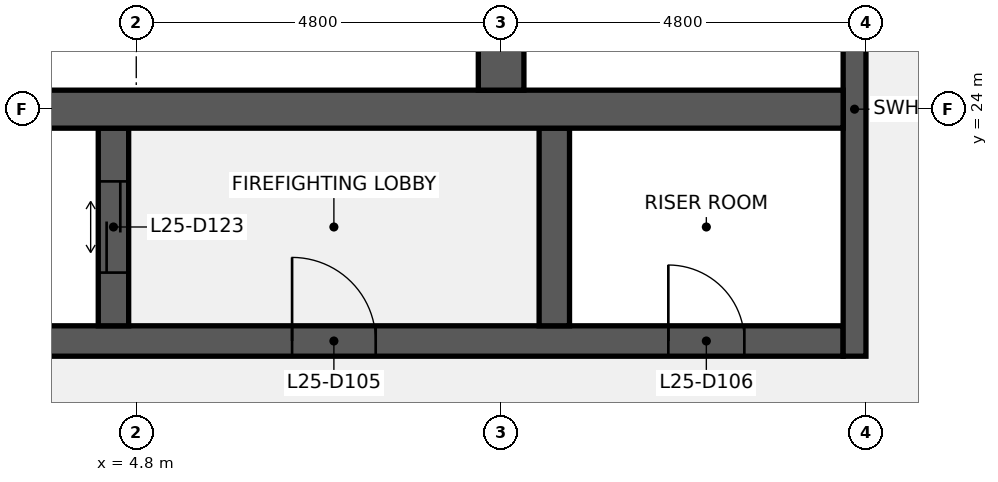
"""IFC4 building model, lengths in metres.
Left out: names, types, materials, properties, quantities, classifications, styles, units other than length and angle.
Written with IfcOpenShell. Run it as: python <this file> out.ifc"""

import sys

from ifc_helpers import new_model, si_unit, direction, frame, frame_2d, origin, place, context, subcontext, project, spatial, rectangle, extrude, element, fill, save


model = new_model("IFC4")
c1 = context("Model", 3, precision=1e-05, world=origin(), true_north=direction((0.0, 1.0)))
c2 = subcontext(c1, "Body", "Model", "MODEL_VIEW")
j1 = project(units=[si_unit("LENGTHUNIT", "METRE"), si_unit("PLANEANGLEUNIT", "RADIAN")], contexts=[c1])
p1 = place(None, origin())
s1 = spatial("IfcSite", under=j1, at=p1, CompositionType="ELEMENT")
p2 = place(p1, origin())
s2 = spatial("IfcBuilding", under=s1, at=p2, CompositionType="ELEMENT")
p3 = place(p2, frame((0.0, 0.0, 120.1)))
s3 = spatial("IfcBuildingStorey", under=s2, at=p3, CompositionType="ELEMENT", Elevation=120.1)
p4 = place(p3, frame((1.0, 20.95, 0.0), z_axis=(0.0, 0.0, 1.0), x_axis=(1.0, 0.0, 0.0)))
e1 = element("IfcWall", 1, at=p4, inside=s3, PredefinedType="SHEAR", context=c2, shape_type="SweptSolid", body=[
    extrude(rectangle(XDim=13.1, YDim=0.4, at=frame_2d((6.55, 0.0))), origin(), (0.0, 0.0, 1.0), 3.84),
])
p5 = place(p4, frame((5.85, 0.0, 0.0)))
e2 = element("IfcOpeningElement", 2, at=p5, cuts=e1, PredefinedType="OPENING", context=c2, shape_type="SweptSolid", body=[
    extrude(rectangle(XDim=1.1, YDim=2.1, at=frame_2d((0.55, 1.05))), frame((0.0, 0.21, 0.0), z_axis=(0.0, -1.0, 0.0), x_axis=(1.0, 0.0, 0.0)), (0.0, 0.0, 1.0), 0.42),
])
p6 = place(p4, frame((10.8, 0.0, 0.0)))
e3 = element("IfcOpeningElement", 3, at=p6, cuts=e1, PredefinedType="OPENING", context=c2, shape_type="SweptSolid", body=[
    extrude(rectangle(XDim=1.0, YDim=2.1, at=frame_2d((0.5, 1.05))), frame((0.0, 0.21, 0.0), z_axis=(0.0, -1.0, 0.0), x_axis=(1.0, 0.0, 0.0)), (0.0, 0.0, 1.0), 0.42),
])
p7 = place(p3, frame((14.25, 20.75, 0.0), z_axis=(0.0, 0.0, 1.0), x_axis=(0.0, 1.0, 0.0)))
e4 = element("IfcWall", 4, at=p7, inside=s3, PredefinedType="SHEAR", context=c2, shape_type="SweptSolid", body=[
    extrude(rectangle(XDim=6.5, YDim=0.3, at=frame_2d((3.25, 0.0))), origin(), (0.0, 0.0, 1.0), 3.84),
])
p8 = place(p3, frame((4.5, 21.15, 0.0), z_axis=(0.0, 0.0, 1.0), x_axis=(0.0, 1.0, 0.0)))
e5 = element("IfcWall", 5, at=p8, inside=s3, PredefinedType="SHEAR", context=c2, shape_type="SweptSolid", body=[
    extrude(rectangle(XDim=2.6, YDim=0.4, at=frame_2d((1.3, 0.0))), origin(), (0.0, 0.0, 1.0), 3.84),
])
p9 = place(p8, frame((0.7, 0.0, 0.0)))
e6 = element("IfcOpeningElement", 6, at=p9, cuts=e5, PredefinedType="OPENING", context=c2, shape_type="SweptSolid", body=[
    extrude(rectangle(XDim=1.2, YDim=2.1, at=frame_2d((0.6, 1.05))), frame((0.0, 0.21, 0.0), z_axis=(0.0, -1.0, 0.0), x_axis=(1.0, 0.0, 0.0)), (0.0, 0.0, 1.0), 0.42),
])
p10 = place(p3, frame((10.3, 21.15, 0.0), z_axis=(0.0, 0.0, 1.0), x_axis=(0.0, 1.0, 0.0)))
e7 = element("IfcWall", 7, at=p10, inside=s3, PredefinedType="SHEAR", context=c2, shape_type="SweptSolid", body=[
    extrude(rectangle(XDim=2.6, YDim=0.4, at=frame_2d((1.3, 0.0))), origin(), (0.0, 0.0, 1.0), 3.84),
])
p11 = place(p3, frame((1.0, 24.0, 0.0), z_axis=(0.0, 0.0, 1.0), x_axis=(1.0, 0.0, 0.0)))
e8 = element("IfcWall", 8, at=p11, inside=s3, PredefinedType="SHEAR", context=c2, shape_type="SweptSolid", body=[
    extrude(rectangle(XDim=13.1, YDim=0.5, at=frame_2d((6.55, 0.0))), origin(), (0.0, 0.0, 1.0), 3.84),
])
p12 = place(p3, frame((9.6, 24.25, 0.0), z_axis=(0.0, 0.0, 1.0), x_axis=(0.0, 1.0, 0.0)))
e9 = element("IfcWall", 9, at=p12, inside=s3, PredefinedType="SHEAR", context=c2, shape_type="SweptSolid", body=[
    extrude(rectangle(XDim=2.6, YDim=0.6, at=frame_2d((1.3, 0.0))), origin(), (0.0, 0.0, 1.0), 3.84),
])
p13 = place(p5, origin())
e10 = element("IfcDoor", 10, at=p13, inside=s3, OperationType="SINGLE_SWING_LEFT", PredefinedType="DOOR", context=c2, shape_type="SweptSolid", body=[
    extrude(rectangle(XDim=1.1, YDim=2.1, at=frame_2d((0.55, 1.05))), frame((0.0, 0.025, 0.0), z_axis=(0.0, -1.0, 0.0), x_axis=(1.0, 0.0, 0.0)), (0.0, 0.0, 1.0), 0.05),
])
fill(e2, e10)
p14 = place(p6, origin())
e11 = element("IfcDoor", 11, at=p14, inside=s3, OperationType="SINGLE_SWING_LEFT", PredefinedType="DOOR", context=c2, shape_type="SweptSolid", body=[
    extrude(rectangle(XDim=1.0, YDim=2.1, at=frame_2d((0.5, 1.05))), frame((0.0, 0.025, 0.0), z_axis=(0.0, -1.0, 0.0), x_axis=(1.0, 0.0, 0.0)), (0.0, 0.0, 1.0), 0.05),
])
fill(e3, e11)
p15 = place(p9, origin())
e12 = element("IfcDoor", 12, at=p15, inside=s3, OperationType="DOUBLE_DOOR_SLIDING", PredefinedType="DOOR", context=c2, shape_type="SweptSolid", body=[
    extrude(rectangle(XDim=1.2, YDim=2.1, at=frame_2d((0.6, 1.05))), frame((0.0, 0.025, 0.0), z_axis=(0.0, -1.0, 0.0), x_axis=(1.0, 0.0, 0.0)), (0.0, 0.0, 1.0), 0.05),
])
fill(e6, e12)
save(model, sys.argv[1])
